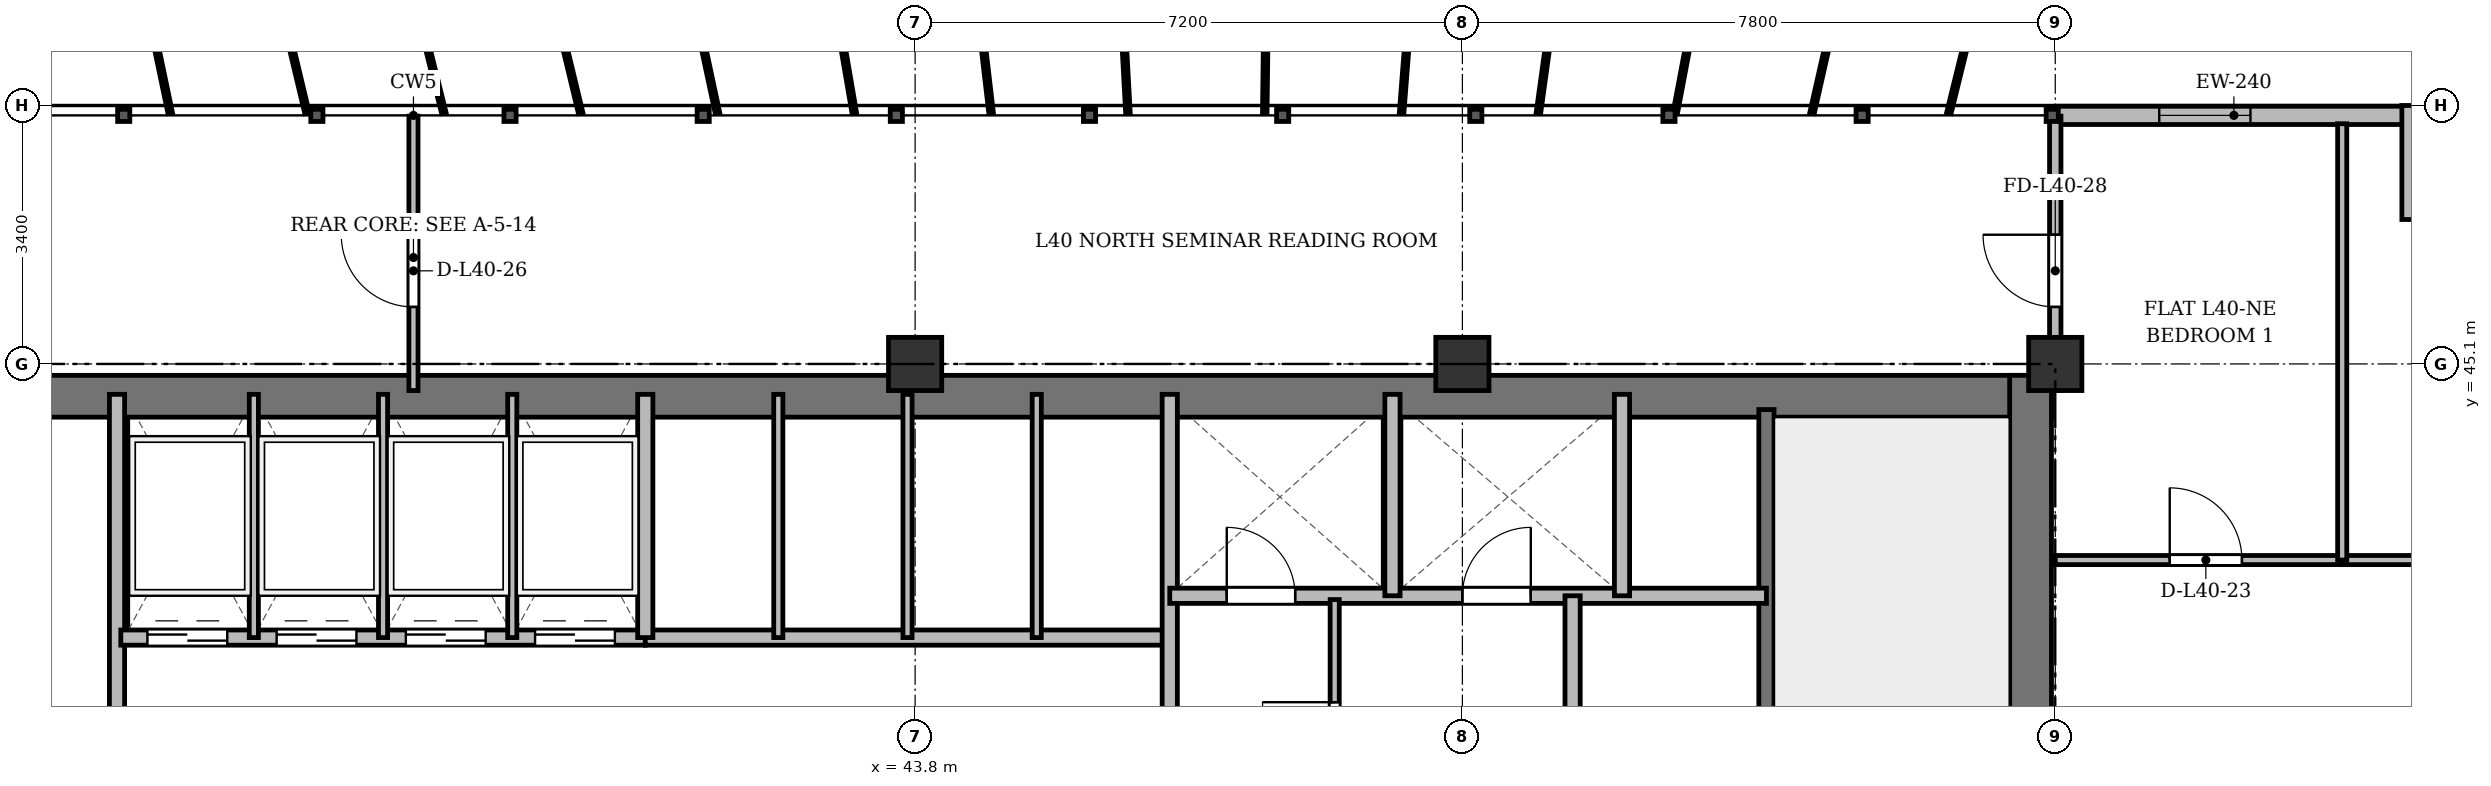
"""IFC4 building model, lengths in metres.
Left out: names, types, materials, properties, quantities, classifications, styles, units other than length and angle.
Written with IfcOpenShell. Run it as: python <this file> out.ifc"""

import sys

from ifc_helpers import new_model, si_unit, direction, frame, frame_2d, origin, origin_2d, place, context, subcontext, project, spatial, rectangle, extrude, source, transform, mapped, element, fill, save


model = new_model("IFC4")
c1 = context("Model", 3, precision=1e-05, world=origin(), true_north=direction((0.0, 1.0)))
c2 = subcontext(c1, "Body", "Model", "MODEL_VIEW")
j1 = project(units=[si_unit("LENGTHUNIT", "METRE"), si_unit("PLANEANGLEUNIT", "RADIAN")], contexts=[c1])
p1 = place(None, origin())
s1 = spatial("IfcSite", under=j1, at=p1, CompositionType="ELEMENT")
p2 = place(p1, origin())
s2 = spatial("IfcBuilding", under=s1, at=p2, CompositionType="ELEMENT")
p3 = place(p2, frame((0.0, 0.0, 153.7)))
s3 = spatial("IfcBuildingStorey", under=s2, at=p3, CompositionType="ELEMENT", Elevation=153.7)
m1 = source(origin(), c2, "Body", "SweptSolid", [
    extrude(rectangle(XDim=0.7, YDim=0.7, at=origin_2d()), origin(), (0.0, 0.0, 1.0), 3.6),
])
for number, where, z_axis, x_axis in (
    (1, (43.8, 45.1, 0.0), (0.0, 0.0, 1.0), (1.0, 0.0, 0.0)),
    (2, (51.0, 45.1, 0.0), (0.0, 0.0, 1.0), (1.0, 0.0, 0.0)),
    (3, (58.8, 45.1, 0.0), (0.0, 0.0, 1.0), (1.0, 0.0, 0.0)),
):
    element("IfcColumn", number, at=place(p3, frame(where, z_axis=z_axis, x_axis=x_axis)), inside=s3, PredefinedType="COLUMN", context=c2, shape_type="MappedRepresentation", body=[
        mapped(m1, transform((0.0, 0.0, 0.0), x_axis=(1.0, 0.0, 0.0), y_axis=(0.0, 1.0, 0.0), z_axis=(0.0, 0.0, 1.0), scale=1.0)),
    ])
p4 = place(p3, frame((58.8, 48.37, 0.0), z_axis=(0.0, 0.0, 1.0), x_axis=(1.0, 0.0, 0.0)))
e4 = element("IfcWall", 4, at=p4, inside=s3, PredefinedType="SOLIDWALL", context=c2, shape_type="SweptSolid", body=[
    extrude(rectangle(XDim=4.7, YDim=0.24, at=frame_2d((2.35, 0.0))), origin(), (0.0, 0.0, 1.0), 3.35),
])
p5 = place(p4, frame((1.368, 0.0, 0.9)))
e5 = element("IfcOpeningElement", 5, at=p5, cuts=e4, PredefinedType="OPENING", context=c2, shape_type="SweptSolid", body=[
    extrude(rectangle(XDim=1.2, YDim=1.65, at=frame_2d((0.6, 0.825))), frame((0.0, 0.13, 0.0), z_axis=(0.0, -1.0, 0.0), x_axis=(1.0, 0.0, 0.0)), (0.0, 0.0, 1.0), 0.26),
])
p6 = place(p3, frame((63.48, 48.5, 0.0), z_axis=(0.0, 0.0, 1.0), x_axis=(0.0, -1.0, 0.0)))
e6 = element("IfcWall", 6, at=p6, inside=s3, PredefinedType="SOLIDWALL", context=c2, shape_type="SweptSolid", body=[
    extrude(rectangle(XDim=1.5, YDim=0.24, at=frame_2d((0.75, 0.0))), origin(), (0.0, 0.0, 1.0), 3.35),
])
p7 = place(p3, frame((15.65, 44.675, 0.0), z_axis=(0.0, 0.0, 1.0), x_axis=(1.0, 0.0, 0.0)))
e7 = element("IfcWall", 7, at=p7, inside=s3, PredefinedType="SHEAR", context=c2, shape_type="SweptSolid", body=[
    extrude(rectangle(XDim=43.1, YDim=0.55, at=frame_2d((21.55, 0.0))), origin(), (0.0, 0.0, 1.0), 3.35),
])
p8 = place(p3, frame((58.475, 33.4, 0.0), z_axis=(0.0, 0.0, 1.0), x_axis=(0.0, 1.0, 0.0)))
e8 = element("IfcWall", 8, at=p8, inside=s3, PredefinedType="SHEAR", context=c2, shape_type="SweptSolid", body=[
    extrude(rectangle(XDim=11.55, YDim=0.55, at=frame_2d((5.775, 0.0))), origin(), (0.0, 0.0, 1.0), 3.35),
])
p9 = place(p3, frame((55.0, 33.4, 0.0), z_axis=(0.0, 0.0, 1.0), x_axis=(0.0, 1.0, 0.0)))
e9 = element("IfcWall", 9, at=p9, inside=s3, PredefinedType="SHEAR", context=c2, shape_type="SweptSolid", body=[
    extrude(rectangle(XDim=11.1, YDim=0.2, at=frame_2d((5.55, 0.0))), origin(), (0.0, 0.0, 1.0), 3.35),
])
p10 = place(p9, frame((0.85, 0.0, 0.0)))
e10 = element("IfcOpeningElement", 10, at=p10, cuts=e9, PredefinedType="OPENING", context=c2, shape_type="SweptSolid", body=[
    extrude(rectangle(XDim=1.1, YDim=2.15, at=frame_2d((0.55, 1.075))), frame((0.0, 0.11, 0.0), z_axis=(0.0, -1.0, 0.0), x_axis=(1.0, 0.0, 0.0)), (0.0, 0.0, 1.0), 0.22),
])
p11 = place(p3, frame((33.3, 33.4, 0.0), z_axis=(0.0, 0.0, 1.0), x_axis=(0.0, 1.0, 0.0)))
e11 = element("IfcWall", 11, at=p11, inside=s3, PredefinedType="SOLIDWALL", context=c2, shape_type="SweptSolid", body=[
    extrude(rectangle(XDim=11.3, YDim=0.2, at=frame_2d((5.65, 0.0))), origin(), (0.0, 0.0, 1.0), 2.75),
])
p12 = place(p3, frame((33.35, 41.5, 0.0), z_axis=(0.0, 0.0, 1.0), x_axis=(1.0, 0.0, 0.0)))
e12 = element("IfcWall", 12, at=p12, inside=s3, PredefinedType="SOLIDWALL", context=c2, shape_type="SweptSolid", body=[
    extrude(rectangle(XDim=6.9, YDim=0.2, at=frame_2d((3.45, 0.0))), origin(), (0.0, 0.0, 1.0), 3.35),
])
p13 = place(p12, frame((0.35, 0.0, 0.0)))
e13 = element("IfcOpeningElement", 13, at=p13, cuts=e12, PredefinedType="OPENING", context=c2, shape_type="SweptSolid", body=[
    extrude(rectangle(XDim=1.05, YDim=2.15, at=frame_2d((0.525, 1.075))), frame((0.0, 0.11, 0.0), z_axis=(0.0, -1.0, 0.0), x_axis=(1.0, 0.0, 0.0)), (0.0, 0.0, 1.0), 0.22),
])
p14 = place(p12, frame((2.05, 0.0, 0.0)))
e14 = element("IfcOpeningElement", 14, at=p14, cuts=e12, PredefinedType="OPENING", context=c2, shape_type="SweptSolid", body=[
    extrude(rectangle(XDim=1.05, YDim=2.15, at=frame_2d((0.525, 1.075))), frame((0.0, 0.11, 0.0), z_axis=(0.0, -1.0, 0.0), x_axis=(1.0, 0.0, 0.0)), (0.0, 0.0, 1.0), 0.22),
])
p15 = place(p12, frame((3.75, 0.0, 0.0)))
e15 = element("IfcOpeningElement", 15, at=p15, cuts=e12, PredefinedType="OPENING", context=c2, shape_type="SweptSolid", body=[
    extrude(rectangle(XDim=1.05, YDim=2.15, at=frame_2d((0.525, 1.075))), frame((0.0, 0.11, 0.0), z_axis=(0.0, -1.0, 0.0), x_axis=(1.0, 0.0, 0.0)), (0.0, 0.0, 1.0), 0.22),
])
p16 = place(p12, frame((5.45, 0.0, 0.0)))
e16 = element("IfcOpeningElement", 16, at=p16, cuts=e12, PredefinedType="OPENING", context=c2, shape_type="SweptSolid", body=[
    extrude(rectangle(XDim=1.05, YDim=2.15, at=frame_2d((0.525, 1.075))), frame((0.0, 0.11, 0.0), z_axis=(0.0, -1.0, 0.0), x_axis=(1.0, 0.0, 0.0)), (0.0, 0.0, 1.0), 0.22),
])
for number, where, z_axis, x_axis in (
    (17, (35.1, 41.5, 0.0), (0.0, 0.0, 1.0), (0.0, 1.0, 0.0)),
    (18, (36.8, 41.5, 0.0), (0.0, 0.0, 1.0), (0.0, 1.0, 0.0)),
    (19, (38.5, 41.5, 0.0), (0.0, 0.0, 1.0), (0.0, 1.0, 0.0)),
):
    element("IfcWall", number, at=place(p3, frame(where, z_axis=z_axis, x_axis=x_axis)), inside=s3, PredefinedType="PARTITIONING", context=c2, shape_type="SweptSolid", body=[
        extrude(rectangle(XDim=3.2, YDim=0.12, at=frame_2d((1.6, 0.0))), origin(), (0.0, 0.0, 1.0), 3.35),
    ])
p17 = place(p3, frame((40.25, 41.5, 0.0), z_axis=(0.0, 0.0, 1.0), x_axis=(1.0, 0.0, 0.0)))
e20 = element("IfcWall", 20, at=p17, inside=s3, PredefinedType="SOLIDWALL", context=c2, shape_type="SweptSolid", body=[
    extrude(rectangle(XDim=6.9, YDim=0.2, at=frame_2d((3.45, 0.0))), origin(), (0.0, 0.0, 1.0), 2.85),
])
p18 = place(p3, frame((40.25, 41.5, 0.0), z_axis=(0.0, 0.0, 1.0), x_axis=(0.0, 1.0, 0.0)))
e21 = element("IfcWall", 21, at=p18, inside=s3, PredefinedType="SOLIDWALL", context=c2, shape_type="SweptSolid", body=[
    extrude(rectangle(XDim=3.2, YDim=0.2, at=frame_2d((1.6, 0.0))), origin(), (0.0, 0.0, 1.0), 3.35),
])
p19 = place(p3, frame((42.0, 41.5, 0.0), z_axis=(0.0, 0.0, 1.0), x_axis=(0.0, 1.0, 0.0)))
e22 = element("IfcWall", 22, at=p19, inside=s3, PredefinedType="PARTITIONING", context=c2, shape_type="SweptSolid", body=[
    extrude(rectangle(XDim=3.2, YDim=0.12, at=frame_2d((1.6, 0.0))), origin(), (0.0, 0.0, 1.0), 3.35),
])
p20 = place(p3, frame((43.7, 41.5, 0.0), z_axis=(0.0, 0.0, 1.0), x_axis=(0.0, 1.0, 0.0)))
e23 = element("IfcWall", 23, at=p20, inside=s3, PredefinedType="PARTITIONING", context=c2, shape_type="SweptSolid", body=[
    extrude(rectangle(XDim=3.2, YDim=0.12, at=frame_2d((1.6, 0.0))), origin(), (0.0, 0.0, 1.0), 2.85),
])
p21 = place(p3, frame((45.4, 41.5, 0.0), z_axis=(0.0, 0.0, 1.0), x_axis=(0.0, 1.0, 0.0)))
e24 = element("IfcWall", 24, at=p21, inside=s3, PredefinedType="PARTITIONING", context=c2, shape_type="SweptSolid", body=[
    extrude(rectangle(XDim=3.2, YDim=0.12, at=frame_2d((1.6, 0.0))), origin(), (0.0, 0.0, 1.0), 3.35),
])
p22 = place(p3, frame((47.15, 33.4, 0.0), z_axis=(0.0, 0.0, 1.0), x_axis=(0.0, 1.0, 0.0)))
e25 = element("IfcWall", 25, at=p22, inside=s3, PredefinedType="SOLIDWALL", context=c2, shape_type="SweptSolid", body=[
    extrude(rectangle(XDim=11.3, YDim=0.2, at=frame_2d((5.65, 0.0))), origin(), (0.0, 0.0, 1.0), 2.75),
])
p23 = place(p3, frame((47.15, 42.05, 0.0), z_axis=(0.0, 0.0, 1.0), x_axis=(1.0, 0.0, 0.0)))
e26 = element("IfcWall", 26, at=p23, inside=s3, PredefinedType="SOLIDWALL", context=c2, shape_type="SweptSolid", body=[
    extrude(rectangle(XDim=7.85, YDim=0.2, at=frame_2d((3.925, 0.0))), origin(), (0.0, 0.0, 1.0), 2.85),
])
p24 = place(p23, frame((0.75, 0.0, 0.0)))
e27 = element("IfcOpeningElement", 27, at=p24, cuts=e26, PredefinedType="OPENING", context=c2, shape_type="SweptSolid", body=[
    extrude(rectangle(XDim=0.9, YDim=2.1, at=frame_2d((0.45, 1.05))), frame((0.0, 0.11, 0.0), z_axis=(0.0, -1.0, 0.0), x_axis=(1.0, 0.0, 0.0)), (0.0, 0.0, 1.0), 0.22),
])
p25 = place(p23, frame((3.85, 0.0, 0.0)))
e28 = element("IfcOpeningElement", 28, at=p25, cuts=e26, PredefinedType="OPENING", context=c2, shape_type="SweptSolid", body=[
    extrude(rectangle(XDim=0.9, YDim=2.1, at=frame_2d((0.45, 1.05))), frame((0.0, 0.11, 0.0), z_axis=(0.0, -1.0, 0.0), x_axis=(1.0, 0.0, 0.0)), (0.0, 0.0, 1.0), 0.22),
])
for number, where, z_axis, x_axis in (
    (29, (50.08, 42.05, 0.0), (0.0, 0.0, 1.0), (0.0, 1.0, 0.0)),
    (30, (53.1, 42.05, 0.0), (0.0, 0.0, 1.0), (0.0, 1.0, 0.0)),
):
    element("IfcWall", number, at=place(p3, frame(where, z_axis=z_axis, x_axis=x_axis)), inside=s3, PredefinedType="SOLIDWALL", context=c2, shape_type="SweptSolid", body=[
        extrude(rectangle(XDim=2.65, YDim=0.2, at=frame_2d((1.325, 0.0))), origin(), (0.0, 0.0, 1.0), 3.35),
    ])
p26 = place(p3, frame((52.45, 33.4, 0.0), z_axis=(0.0, 0.0, 1.0), x_axis=(0.0, 1.0, 0.0)))
e31 = element("IfcWall", 31, at=p26, inside=s3, PredefinedType="PARTITIONING", context=c2, shape_type="SweptSolid", body=[
    extrude(rectangle(XDim=8.65, YDim=0.2, at=frame_2d((4.325, 0.0))), origin(), (0.0, 0.0, 1.0), 2.75),
])
p27 = place(p26, frame((6.2, 0.0, 0.0)))
e32 = element("IfcOpeningElement", 32, at=p27, cuts=e31, PredefinedType="OPENING", context=c2, shape_type="SweptSolid", body=[
    extrude(rectangle(XDim=0.95, YDim=2.15, at=frame_2d((0.475, 1.075))), frame((0.0, 0.11, 0.0), z_axis=(0.0, -1.0, 0.0), x_axis=(1.0, 0.0, 0.0)), (0.0, 0.0, 1.0), 0.22),
])
p28 = place(p3, frame((49.32, 33.4, 0.0), z_axis=(0.0, 0.0, 1.0), x_axis=(0.0, 1.0, 0.0)))
e33 = element("IfcWall", 33, at=p28, inside=s3, PredefinedType="PARTITIONING", context=c2, shape_type="SweptSolid", body=[
    extrude(rectangle(XDim=8.6, YDim=0.12, at=frame_2d((4.3, 0.0))), origin(), (0.0, 0.0, 1.0), 2.75),
])
p29 = place(p28, frame((0.85, 0.0, 0.0)))
e34 = element("IfcOpeningElement", 34, at=p29, cuts=e33, PredefinedType="OPENING", context=c2, shape_type="SweptSolid", body=[
    extrude(rectangle(XDim=0.95, YDim=2.15, at=frame_2d((0.475, 1.075))), frame((0.0, 0.07, 0.0), z_axis=(0.0, -1.0, 0.0), x_axis=(1.0, 0.0, 0.0)), (0.0, 0.0, 1.0), 0.14),
])
p30 = place(p28, frame((3.55, 0.0, 0.0)))
e35 = element("IfcOpeningElement", 35, at=p30, cuts=e33, PredefinedType="OPENING", context=c2, shape_type="SweptSolid", body=[
    extrude(rectangle(XDim=0.95, YDim=2.15, at=frame_2d((0.475, 1.075))), frame((0.0, 0.07, 0.0), z_axis=(0.0, -1.0, 0.0), x_axis=(1.0, 0.0, 0.0)), (0.0, 0.0, 1.0), 0.14),
])
p31 = place(p28, frame((6.3, 0.0, 0.0)))
e36 = element("IfcOpeningElement", 36, at=p31, cuts=e33, PredefinedType="OPENING", context=c2, shape_type="SweptSolid", body=[
    extrude(rectangle(XDim=0.95, YDim=2.15, at=frame_2d((0.475, 1.075))), frame((0.0, 0.07, 0.0), z_axis=(0.0, -1.0, 0.0), x_axis=(1.0, 0.0, 0.0)), (0.0, 0.0, 1.0), 0.14),
])
p32 = place(p3, frame((58.8, 42.52, 0.0), z_axis=(0.0, 0.0, 1.0), x_axis=(1.0, 0.0, 0.0)))
e37 = element("IfcWall", 37, at=p32, inside=s3, PredefinedType="PARTITIONING", context=c2, shape_type="SweptSolid", body=[
    extrude(rectangle(XDim=3.775, YDim=0.12, at=frame_2d((1.887, 0.0))), origin(), (0.0, 0.0, 1.0), 2.85),
])
p33 = place(p32, frame((1.506, 0.0, 0.0)))
e38 = element("IfcOpeningElement", 38, at=p33, cuts=e37, PredefinedType="OPENING", context=c2, shape_type="SweptSolid", body=[
    extrude(rectangle(XDim=0.95, YDim=2.15, at=frame_2d((0.475, 1.075))), frame((0.0, 0.07, 0.0), z_axis=(0.0, -1.0, 0.0), x_axis=(1.0, 0.0, 0.0)), (0.0, 0.0, 1.0), 0.14),
])
p34 = place(p3, frame((62.575, 42.52, 0.0), z_axis=(0.0, 0.0, 1.0), x_axis=(1.0, 0.0, 0.0)))
e39 = element("IfcWall", 39, at=p34, inside=s3, PredefinedType="PARTITIONING", context=c2, shape_type="SweptSolid", body=[
    extrude(rectangle(XDim=3.775, YDim=0.12, at=frame_2d((1.888, 0.0))), origin(), (0.0, 0.0, 1.0), 2.85),
])
p35 = place(p34, frame((1.319, 0.0, 0.0)))
e40 = element("IfcOpeningElement", 40, at=p35, cuts=e39, PredefinedType="OPENING", context=c2, shape_type="SweptSolid", body=[
    extrude(rectangle(XDim=0.95, YDim=2.15, at=frame_2d((0.475, 1.075))), frame((0.0, 0.07, 0.0), z_axis=(0.0, -1.0, 0.0), x_axis=(1.0, 0.0, 0.0)), (0.0, 0.0, 1.0), 0.14),
])
p36 = place(p3, frame((62.575, 42.52, 0.0), z_axis=(0.0, 0.0, 1.0), x_axis=(0.0, 1.0, 0.0)))
e41 = element("IfcWall", 41, at=p36, inside=s3, PredefinedType="PARTITIONING", context=c2, shape_type="SweptSolid", body=[
    extrude(rectangle(XDim=5.74, YDim=0.12, at=frame_2d((2.87, 0.0))), origin(), (0.0, 0.0, 1.0), 2.75),
])
p37 = place(p3, frame((37.2, 44.75, 0.0), z_axis=(0.0, 0.0, 1.0), x_axis=(0.0, 1.0, 0.0)))
e42 = element("IfcWall", 42, at=p37, inside=s3, PredefinedType="PARTITIONING", context=c2, shape_type="SweptSolid", body=[
    extrude(rectangle(XDim=3.61, YDim=0.12, at=frame_2d((1.805, 0.0))), origin(), (0.0, 0.0, 1.0), 2.75),
])
p38 = place(p37, frame((1.1, 0.0, 0.0)))
e43 = element("IfcOpeningElement", 43, at=p38, cuts=e42, PredefinedType="OPENING", context=c2, shape_type="SweptSolid", body=[
    extrude(rectangle(XDim=0.95, YDim=2.15, at=frame_2d((0.475, 1.075))), frame((0.0, 0.07, 0.0), z_axis=(0.0, -1.0, 0.0), x_axis=(1.0, 0.0, 0.0)), (0.0, 0.0, 1.0), 0.14),
])
p39 = place(p3, frame((58.8, 44.75, 0.0), z_axis=(0.0, 0.0, 1.0), x_axis=(0.0, 1.0, 0.0)))
e44 = element("IfcWall", 44, at=p39, inside=s3, PredefinedType="PARTITIONING", context=c2, shape_type="SweptSolid", body=[
    extrude(rectangle(XDim=3.61, YDim=0.15, at=frame_2d((1.805, 0.0))), origin(), (0.0, 0.0, 1.0), 2.85),
])
p40 = place(p39, frame((1.1, 0.0, 0.0)))
e45 = element("IfcOpeningElement", 45, at=p40, cuts=e44, PredefinedType="OPENING", context=c2, shape_type="SweptSolid", body=[
    extrude(rectangle(XDim=0.95, YDim=2.15, at=frame_2d((0.475, 1.075))), frame((0.0, 0.085, 0.0), z_axis=(0.0, -1.0, 0.0), x_axis=(1.0, 0.0, 0.0)), (0.0, 0.0, 1.0), 0.17),
])
m2 = source(origin(), c2, "Body", "SweptSolid", [
    extrude(rectangle(XDim=1.2, YDim=1.65, at=frame_2d((0.6, 0.825))), frame((0.0, 0.03, 0.0), z_axis=(0.0, -1.0, 0.0), x_axis=(1.0, 0.0, 0.0)), (0.0, 0.0, 1.0), 0.06),
])
p41 = place(p5, origin())
e46 = element("IfcWindow", 46, at=p41, inside=s3, PartitioningType="SINGLE_PANEL", PredefinedType="WINDOW", context=c2, shape_type="MappedRepresentation", body=[
    mapped(m2, transform((0.0, 0.0, 0.0), x_axis=(1.0, 0.0, 0.0), y_axis=(0.0, 1.0, 0.0), z_axis=(0.0, 0.0, 1.0), scale=1.0)),
])
fill(e5, e46)
m3 = source(origin(), c2, "Body", "SweptSolid", [
    extrude(rectangle(XDim=1.05, YDim=2.15, at=frame_2d((0.525, 1.075))), frame((0.0, 0.025, 0.0), z_axis=(0.0, -1.0, 0.0), x_axis=(1.0, 0.0, 0.0)), (0.0, 0.0, 1.0), 0.05),
])
p42 = place(p13, origin())
e47 = element("IfcDoor", 47, at=p42, inside=s3, OperationType="DOUBLE_DOOR_SLIDING", PredefinedType="DOOR", context=c2, shape_type="MappedRepresentation", body=[
    mapped(m3, transform((0.0, 0.0, 0.0), x_axis=(1.0, 0.0, 0.0), y_axis=(0.0, 1.0, 0.0), z_axis=(0.0, 0.0, 1.0), scale=1.0)),
])
fill(e13, e47)
p43 = place(p14, origin())
e48 = element("IfcDoor", 48, at=p43, inside=s3, OperationType="DOUBLE_DOOR_SLIDING", PredefinedType="DOOR", context=c2, shape_type="MappedRepresentation", body=[
    mapped(m3, transform((0.0, 0.0, 0.0), x_axis=(1.0, 0.0, 0.0), y_axis=(0.0, 1.0, 0.0), z_axis=(0.0, 0.0, 1.0), scale=1.0)),
])
fill(e14, e48)
p44 = place(p15, origin())
e49 = element("IfcDoor", 49, at=p44, inside=s3, OperationType="DOUBLE_DOOR_SLIDING", PredefinedType="DOOR", context=c2, shape_type="MappedRepresentation", body=[
    mapped(m3, transform((0.0, 0.0, 0.0), x_axis=(1.0, 0.0, 0.0), y_axis=(0.0, 1.0, 0.0), z_axis=(0.0, 0.0, 1.0), scale=1.0)),
])
fill(e15, e49)
p45 = place(p16, origin())
e50 = element("IfcDoor", 50, at=p45, inside=s3, OperationType="DOUBLE_DOOR_SLIDING", PredefinedType="DOOR", context=c2, shape_type="MappedRepresentation", body=[
    mapped(m3, transform((0.0, 0.0, 0.0), x_axis=(1.0, 0.0, 0.0), y_axis=(0.0, 1.0, 0.0), z_axis=(0.0, 0.0, 1.0), scale=1.0)),
])
fill(e16, e50)
m4 = source(origin(), c2, "Body", "SweptSolid", [
    extrude(rectangle(XDim=0.9, YDim=2.1, at=frame_2d((0.45, 1.05))), frame((0.0, 0.025, 0.0), z_axis=(0.0, -1.0, 0.0), x_axis=(1.0, 0.0, 0.0)), (0.0, 0.0, 1.0), 0.05),
])
p46 = place(p24, origin())
e51 = element("IfcDoor", 51, at=p46, inside=s3, OperationType="SINGLE_SWING_LEFT", PredefinedType="DOOR", context=c2, shape_type="MappedRepresentation", body=[
    mapped(m4, transform((0.0, 0.0, 0.0), x_axis=(1.0, 0.0, 0.0), y_axis=(0.0, 1.0, 0.0), z_axis=(0.0, 0.0, 1.0), scale=1.0)),
])
fill(e27, e51)
p47 = place(p25, origin())
e52 = element("IfcDoor", 52, at=p47, inside=s3, OperationType="SINGLE_SWING_RIGHT", PredefinedType="DOOR", context=c2, shape_type="MappedRepresentation", body=[
    mapped(m4, transform((0.0, 0.0, 0.0), x_axis=(1.0, 0.0, 0.0), y_axis=(0.0, 1.0, 0.0), z_axis=(0.0, 0.0, 1.0), scale=1.0)),
])
fill(e28, e52)
m5 = source(origin(), c2, "Body", "SweptSolid", [
    extrude(rectangle(XDim=0.95, YDim=2.15, at=frame_2d((0.475, 1.075))), frame((0.0, 0.025, 0.0), z_axis=(0.0, -1.0, 0.0), x_axis=(1.0, 0.0, 0.0)), (0.0, 0.0, 1.0), 0.05),
])
p48 = place(p31, origin())
e53 = element("IfcDoor", 53, at=p48, inside=s3, OperationType="SINGLE_SWING_RIGHT", PredefinedType="DOOR", context=c2, shape_type="MappedRepresentation", body=[
    mapped(m5, transform((0.0, 0.0, 0.0), x_axis=(1.0, 0.0, 0.0), y_axis=(0.0, 1.0, 0.0), z_axis=(0.0, 0.0, 1.0), scale=1.0)),
])
fill(e36, e53)
p49 = place(p33, origin())
e54 = element("IfcDoor", 54, at=p49, inside=s3, OperationType="SINGLE_SWING_LEFT", PredefinedType="DOOR", context=c2, shape_type="MappedRepresentation", body=[
    mapped(m5, transform((0.0, 0.0, 0.0), x_axis=(1.0, 0.0, 0.0), y_axis=(0.0, 1.0, 0.0), z_axis=(0.0, 0.0, 1.0), scale=1.0)),
])
fill(e38, e54)
p50 = place(p38, origin())
e55 = element("IfcDoor", 55, at=p50, inside=s3, OperationType="SINGLE_SWING_RIGHT", PredefinedType="DOOR", context=c2, shape_type="MappedRepresentation", body=[
    mapped(m5, transform((0.0, 0.0, 0.0), x_axis=(1.0, 0.0, 0.0), y_axis=(0.0, 1.0, 0.0), z_axis=(0.0, 0.0, 1.0), scale=1.0)),
])
fill(e43, e55)
p51 = place(p40, origin())
e56 = element("IfcDoor", 56, at=p51, inside=s3, OperationType="SINGLE_SWING_RIGHT", PredefinedType="DOOR", context=c2, shape_type="MappedRepresentation", body=[
    mapped(m5, transform((0.0, 0.0, 0.0), x_axis=(1.0, 0.0, 0.0), y_axis=(0.0, 1.0, 0.0), z_axis=(0.0, 0.0, 1.0), scale=1.0)),
])
fill(e45, e56)
save(model, sys.argv[1])
